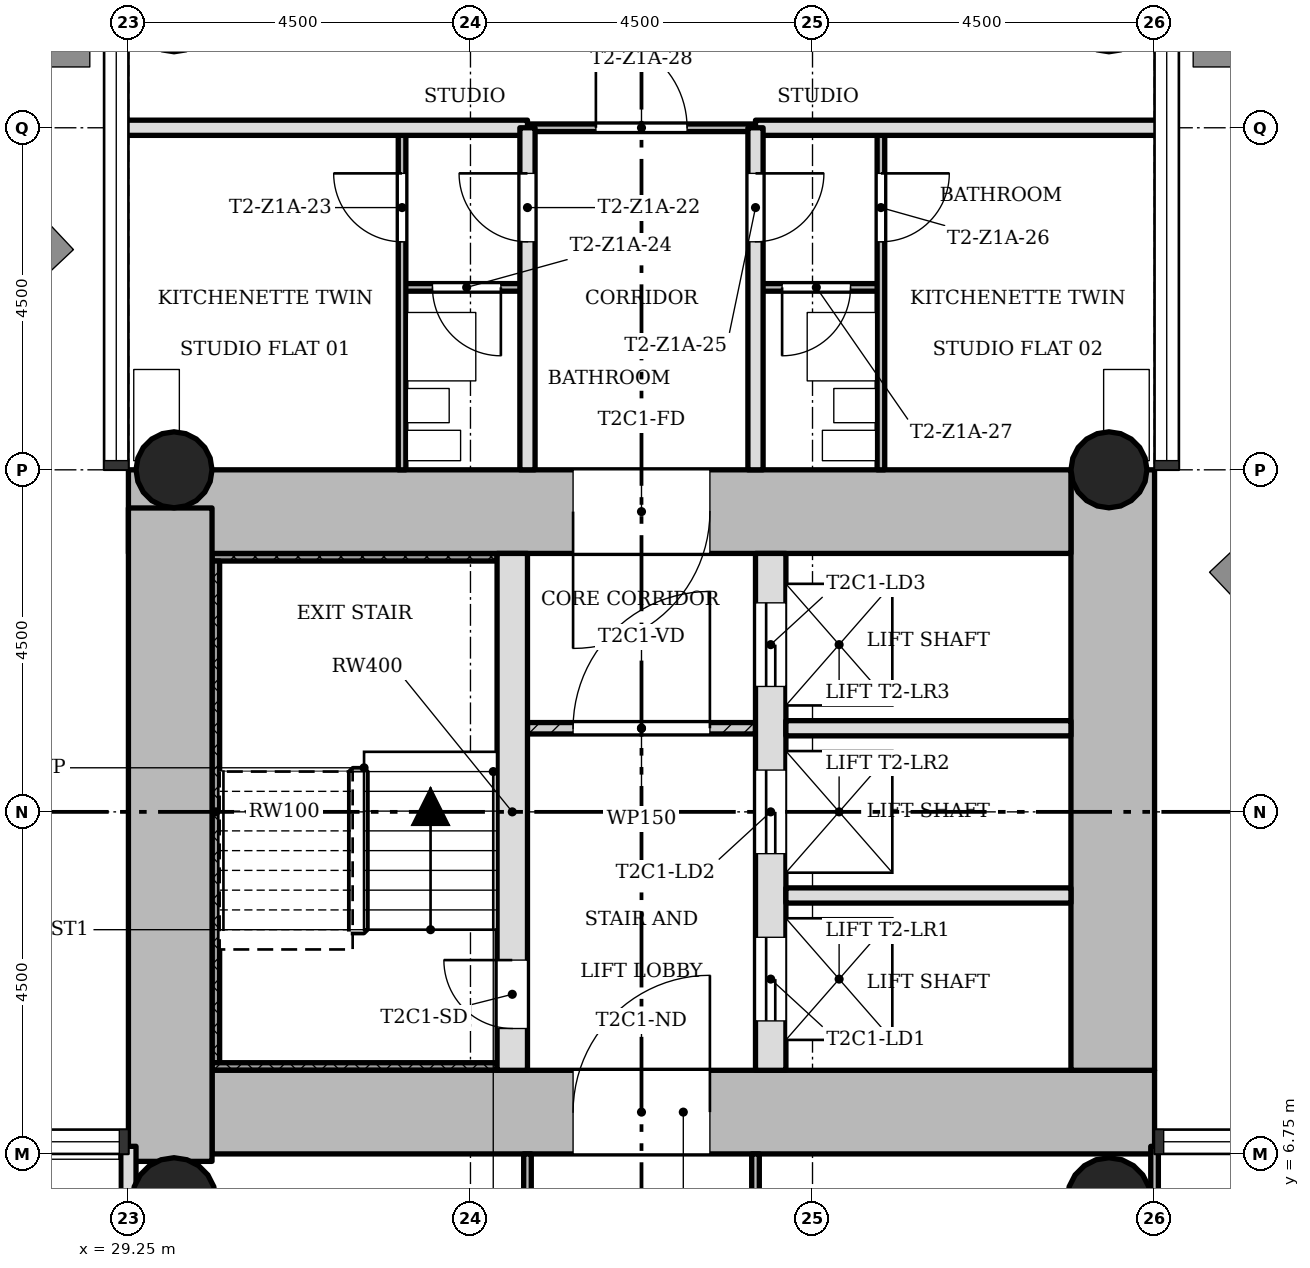
"""IFC4 building model, lengths in metres.
Left out: names, types, materials, properties, quantities, classifications, styles, units other than length and angle.
Written with IfcOpenShell. Run it as: python <this file> out.ifc"""

import sys

from ifc_helpers import new_model, si_unit, direction, frame, frame_2d, origin, origin_2d, place, context, subcontext, project, spatial, rectangle, hollow_circle, extrude, element, fill, save


model = new_model("IFC4")
c1 = context("Model", 3, precision=1e-05, world=origin(), true_north=direction((0.0, 1.0)))
c2 = subcontext(c1, "Body", "Model", "MODEL_VIEW")
j1 = project(units=[si_unit("LENGTHUNIT", "METRE"), si_unit("PLANEANGLEUNIT", "RADIAN")], contexts=[c1])
p1 = place(None, origin())
s1 = spatial("IfcSite", under=j1, at=p1, CompositionType="ELEMENT")
p2 = place(p1, origin())
s2 = spatial("IfcBuilding", under=s1, at=p2, CompositionType="ELEMENT")
p3 = place(p2, frame((0.0, 0.0, 31.3)))
s3 = spatial("IfcBuildingStorey", under=s2, at=p3, CompositionType="ELEMENT", Elevation=31.3)
p4 = place(p3, frame((30.35, 7.3, 0.0), z_axis=(0.0, 0.0, 1.0), x_axis=(1.0, 0.0, 0.0)))
e1 = element("IfcWall", 1, at=p4, inside=s3, PredefinedType="SHEAR", context=c2, shape_type="SweptSolid", body=[
    extrude(rectangle(XDim=12.4, YDim=1.1, at=frame_2d((6.2, 0.0))), origin(), (0.0, 0.0, 1.0), 3.4),
])
p5 = place(p4, frame((4.75, 0.0, 0.0)))
e2 = element("IfcOpeningElement", 2, at=p5, cuts=e1, PredefinedType="OPENING", context=c2, shape_type="SweptSolid", body=[
    extrude(rectangle(XDim=1.8, YDim=2.1, at=frame_2d((0.9, 1.05))), frame((0.0, 0.56, 0.0), z_axis=(0.0, -1.0, 0.0), x_axis=(1.0, 0.0, 0.0)), (0.0, 0.0, 1.0), 1.12),
])
p6 = place(p3, frame((42.2, 7.85, 0.0), z_axis=(0.0, 0.0, 1.0), x_axis=(0.0, 1.0, 0.0)))
e3 = element("IfcWall", 3, at=p6, inside=s3, PredefinedType="SHEAR", context=c2, shape_type="SweptSolid", body=[
    extrude(rectangle(XDim=7.9, YDim=1.1, at=frame_2d((3.95, 0.0))), origin(), (0.0, 0.0, 1.0), 3.4),
])
p7 = place(p3, frame((41.65, 15.2, 0.0), z_axis=(0.0, 0.0, 1.0), x_axis=(-1.0, 0.0, 0.0)))
e4 = element("IfcWall", 4, at=p7, inside=s3, PredefinedType="SHEAR", context=c2, shape_type="SweptSolid", body=[
    extrude(rectangle(XDim=12.4, YDim=1.1, at=frame_2d((6.2, 0.0))), origin(), (0.0, 0.0, 1.0), 3.4),
])
p8 = place(p7, frame((4.75, 0.0, 0.0)))
e5 = element("IfcOpeningElement", 5, at=p8, cuts=e4, PredefinedType="OPENING", context=c2, shape_type="SweptSolid", body=[
    extrude(rectangle(XDim=1.8, YDim=2.1, at=frame_2d((0.9, 1.05))), frame((0.0, 0.56, 0.0), z_axis=(0.0, -1.0, 0.0), x_axis=(1.0, 0.0, 0.0)), (0.0, 0.0, 1.0), 1.12),
])
p9 = place(p3, frame((29.8, 15.248, 0.0), z_axis=(0.0, 0.0, 1.0), x_axis=(0.0, -1.0, 0.0)))
e6 = element("IfcWall", 6, at=p9, inside=s3, PredefinedType="SHEAR", context=c2, shape_type="SweptSolid", body=[
    extrude(rectangle(XDim=8.596, YDim=1.1, at=frame_2d((4.298, 0.0))), origin(), (0.0, 0.0, 1.0), 3.4),
])
p10 = place(p3, frame((34.3, 7.85, 0.0), z_axis=(0.0, 0.0, 1.0), x_axis=(0.0, 1.0, 0.0)))
e7 = element("IfcWall", 7, at=p10, inside=s3, PredefinedType="SHEAR", context=c2, shape_type="SweptSolid", body=[
    extrude(rectangle(XDim=6.8, YDim=0.4, at=frame_2d((3.4, 0.0))), origin(), (0.0, 0.0, 1.0), 3.4),
])
p11 = place(p10, frame((0.55, 0.0, 0.0)))
e8 = element("IfcOpeningElement", 8, at=p11, cuts=e7, PredefinedType="OPENING", context=c2, shape_type="SweptSolid", body=[
    extrude(rectangle(XDim=0.9, YDim=2.1, at=frame_2d((0.45, 1.05))), frame((0.0, 0.21, 0.0), z_axis=(0.0, -1.0, 0.0), x_axis=(1.0, 0.0, 0.0)), (0.0, 0.0, 1.0), 0.42),
])
p12 = place(p3, frame((37.7, 7.85, 0.0), z_axis=(0.0, 0.0, 1.0), x_axis=(0.0, 1.0, 0.0)))
e9 = element("IfcWall", 9, at=p12, inside=s3, PredefinedType="SHEAR", context=c2, shape_type="SweptSolid", body=[
    extrude(rectangle(XDim=6.8, YDim=0.4, at=frame_2d((3.4, 0.0))), origin(), (0.0, 0.0, 1.0), 3.4),
])
p13 = place(p12, frame((0.65, 0.0, 0.0)))
e10 = element("IfcOpeningElement", 10, at=p13, cuts=e9, PredefinedType="OPENING", context=c2, shape_type="SweptSolid", body=[
    extrude(rectangle(XDim=1.1, YDim=2.1, at=frame_2d((0.55, 1.05))), frame((0.0, 0.21, 0.0), z_axis=(0.0, -1.0, 0.0), x_axis=(1.0, 0.0, 0.0)), (0.0, 0.0, 1.0), 0.42),
])
p14 = place(p12, frame((2.85, 0.0, 0.0)))
e11 = element("IfcOpeningElement", 11, at=p14, cuts=e9, PredefinedType="OPENING", context=c2, shape_type="SweptSolid", body=[
    extrude(rectangle(XDim=1.1, YDim=2.1, at=frame_2d((0.55, 1.05))), frame((0.0, 0.21, 0.0), z_axis=(0.0, -1.0, 0.0), x_axis=(1.0, 0.0, 0.0)), (0.0, 0.0, 1.0), 0.42),
])
p15 = place(p12, frame((5.05, 0.0, 0.0)))
e12 = element("IfcOpeningElement", 12, at=p15, cuts=e9, PredefinedType="OPENING", context=c2, shape_type="SweptSolid", body=[
    extrude(rectangle(XDim=1.1, YDim=2.1, at=frame_2d((0.55, 1.05))), frame((0.0, 0.21, 0.0), z_axis=(0.0, -1.0, 0.0), x_axis=(1.0, 0.0, 0.0)), (0.0, 0.0, 1.0), 0.42),
])
for number, where, z_axis, x_axis in (
    (13, (42.15, 15.75, 0.0), (0.0, 0.0, 1.0), (1.0, 0.0, 0.0)),
    (14, (29.85, 15.75, 0.0), (0.0, 0.0, 1.0), (1.0, 0.0, 0.0)),
):
    element("IfcColumn", number, at=place(p3, frame(where, z_axis=z_axis, x_axis=x_axis)), inside=s3, PredefinedType="COLUMN", context=c2, shape_type="SweptSolid", body=[
        extrude(hollow_circle(Radius=0.5, WallThickness=0.036, at=origin_2d()), origin(), (0.0, 0.0, 1.0), 3.4),
    ])
for number, where, z_axis, x_axis in (
    (15, (42.15, 6.15, 0.0), (0.0, 0.0, 1.0), (1.0, 0.0, 0.0)),
    (16, (29.85, 6.15, 0.0), (0.0, 0.0, 1.0), (1.0, 0.0, 0.0)),
):
    element("IfcColumn", number, at=place(p3, frame(where, z_axis=z_axis, x_axis=x_axis)), inside=s3, PredefinedType="COLUMN", context=c2, shape_type="SweptSolid", body=[
        extrude(hollow_circle(Radius=0.55, WallThickness=0.04, at=origin_2d()), origin(), (0.0, 0.0, 1.0), 3.4),
    ])
p16 = place(p3, frame((37.5, 12.35, 0.0), z_axis=(0.0, 0.0, 1.0), x_axis=(-1.0, 0.0, 0.0)))
e17 = element("IfcWall", 17, at=p16, inside=s3, PredefinedType="PARTITIONING", context=c2, shape_type="SweptSolid", body=[
    extrude(rectangle(XDim=3.0, YDim=0.15, at=frame_2d((1.5, 0.0))), origin(), (0.0, 0.0, 1.0), 3.0),
])
p17 = place(p16, frame((0.6, 0.0, 0.0)))
e18 = element("IfcOpeningElement", 18, at=p17, cuts=e17, PredefinedType="OPENING", context=c2, shape_type="SweptSolid", body=[
    extrude(rectangle(XDim=1.8, YDim=2.1, at=frame_2d((0.9, 1.05))), frame((0.0, 0.085, 0.0), z_axis=(0.0, -1.0, 0.0), x_axis=(1.0, 0.0, 0.0)), (0.0, 0.0, 1.0), 0.17),
])
for number, where, z_axis, x_axis in (
    (19, (41.65, 10.15, 0.0), (0.0, 0.0, 1.0), (-1.0, 0.0, 0.0)),
    (20, (41.65, 12.35, 0.0), (0.0, 0.0, 1.0), (-1.0, 0.0, 0.0)),
):
    element("IfcWall", number, at=place(p3, frame(where, z_axis=z_axis, x_axis=x_axis)), inside=s3, PredefinedType="SOLIDWALL", context=c2, shape_type="SweptSolid", body=[
        extrude(rectangle(XDim=3.75, YDim=0.2, at=frame_2d((1.875, 0.0))), origin(), (0.0, 0.0, 1.0), 3.0),
    ])
p18 = place(p3, frame((39.15, 18.15, 0.0), z_axis=(0.0, 0.0, 1.0), x_axis=(-1.0, 0.0, 0.0)))
e21 = element("IfcWall", 21, at=p18, inside=s3, PredefinedType="PARTITIONING", context=c2, shape_type="SweptSolid", body=[
    extrude(rectangle(XDim=1.65, YDim=0.1, at=frame_2d((0.825, 0.0))), origin(), (0.0, 0.0, 1.0), 3.0),
])
p19 = place(p18, frame((0.4, 0.0, 0.0)))
e22 = element("IfcOpeningElement", 22, at=p19, cuts=e21, PredefinedType="OPENING", context=c2, shape_type="SweptSolid", body=[
    extrude(rectangle(XDim=0.9, YDim=2.1, at=frame_2d((0.45, 1.05))), frame((0.0, 0.06, 0.0), z_axis=(0.0, -1.0, 0.0), x_axis=(1.0, 0.0, 0.0)), (0.0, 0.0, 1.0), 0.12),
])
p20 = place(p3, frame((34.5, 18.15, 0.0), z_axis=(0.0, 0.0, 1.0), x_axis=(-1.0, 0.0, 0.0)))
e23 = element("IfcWall", 23, at=p20, inside=s3, PredefinedType="PARTITIONING", context=c2, shape_type="SweptSolid", body=[
    extrude(rectangle(XDim=1.65, YDim=0.1, at=frame_2d((0.825, 0.0))), origin(), (0.0, 0.0, 1.0), 3.0),
])
p21 = place(p20, frame((0.35, 0.0, 0.0)))
e24 = element("IfcOpeningElement", 24, at=p21, cuts=e23, PredefinedType="OPENING", context=c2, shape_type="SweptSolid", body=[
    extrude(rectangle(XDim=0.9, YDim=2.1, at=frame_2d((0.45, 1.05))), frame((0.0, 0.06, 0.0), z_axis=(0.0, -1.0, 0.0), x_axis=(1.0, 0.0, 0.0)), (0.0, 0.0, 1.0), 0.12),
])
p22 = place(p3, frame((37.5, 20.25, 0.0), z_axis=(0.0, 0.0, 1.0), x_axis=(-1.0, 0.0, 0.0)))
e25 = element("IfcWall", 25, at=p22, inside=s3, PredefinedType="PARTITIONING", context=c2, shape_type="SweptSolid", body=[
    extrude(rectangle(XDim=3.0, YDim=0.1, at=frame_2d((1.5, 0.0))), origin(), (0.0, 0.0, 1.0), 3.0),
])
p23 = place(p22, frame((0.9, 0.0, 0.0)))
e26 = element("IfcOpeningElement", 26, at=p23, cuts=e25, PredefinedType="OPENING", context=c2, shape_type="SweptSolid", body=[
    extrude(rectangle(XDim=1.2, YDim=2.1, at=frame_2d((0.6, 1.05))), frame((0.0, 0.06, 0.0), z_axis=(0.0, -1.0, 0.0), x_axis=(1.0, 0.0, 0.0)), (0.0, 0.0, 1.0), 0.12),
])
for number, where, z_axis, x_axis in (
    (27, (42.85, 20.25, 0.0), (0.0, 0.0, 1.0), (-1.0, 0.0, 0.0)),
    (28, (34.5, 20.25, 0.0), (0.0, 0.0, 1.0), (-1.0, 0.0, 0.0)),
):
    element("IfcWall", number, at=place(p3, frame(where, z_axis=z_axis, x_axis=x_axis)), inside=s3, PredefinedType="SOLIDWALL", context=c2, shape_type="SweptSolid", body=[
        extrude(rectangle(XDim=5.35, YDim=0.2, at=frame_2d((2.675, 0.0))), origin(), (0.0, 0.0, 1.0), 3.0),
    ])
p24 = place(p3, frame((42.75, 0.9, 0.0), z_axis=(0.0, 0.0, 1.0), x_axis=(0.0, 1.0, 0.0)))
e29 = element("IfcWall", 29, at=p24, inside=s3, PredefinedType="PARTITIONING", context=c2, shape_type="SweptSolid", body=[
    extrude(rectangle(XDim=5.95, YDim=0.1, at=frame_2d((2.975, 0.0))), origin(), (0.0, 0.0, 1.0), 3.0),
])
p25 = place(p3, frame((39.15, 15.75, 0.0), z_axis=(0.0, 0.0, 1.0), x_axis=(0.0, 1.0, 0.0)))
e30 = element("IfcWall", 30, at=p25, inside=s3, PredefinedType="PARTITIONING", context=c2, shape_type="SweptSolid", body=[
    extrude(rectangle(XDim=4.5, YDim=0.1, at=frame_2d((2.25, 0.0))), origin(), (0.0, 0.0, 1.0), 3.0),
])
p26 = place(p25, frame((3.0, 0.0, 0.0)))
e31 = element("IfcOpeningElement", 31, at=p26, cuts=e30, PredefinedType="OPENING", context=c2, shape_type="SweptSolid", body=[
    extrude(rectangle(XDim=0.9, YDim=2.1, at=frame_2d((0.45, 1.05))), frame((0.0, 0.06, 0.0), z_axis=(0.0, -1.0, 0.0), x_axis=(1.0, 0.0, 0.0)), (0.0, 0.0, 1.0), 0.12),
])
p27 = place(p3, frame((37.5, 0.9, 0.0), z_axis=(0.0, 0.0, 1.0), x_axis=(0.0, 1.0, 0.0)))
e32 = element("IfcWall", 32, at=p27, inside=s3, PredefinedType="PARTITIONING", context=c2, shape_type="SweptSolid", body=[
    extrude(rectangle(XDim=5.85, YDim=0.1, at=frame_2d((2.925, 0.0))), origin(), (0.0, 0.0, 1.0), 3.0),
])
p28 = place(p27, frame((2.475, 0.0, 0.0)))
e33 = element("IfcOpeningElement", 33, at=p28, cuts=e32, PredefinedType="OPENING", context=c2, shape_type="SweptSolid", body=[
    extrude(rectangle(XDim=0.9, YDim=2.1, at=frame_2d((0.45, 1.05))), frame((0.0, 0.06, 0.0), z_axis=(0.0, -1.0, 0.0), x_axis=(1.0, 0.0, 0.0)), (0.0, 0.0, 1.0), 0.12),
])
p29 = place(p3, frame((37.5, 15.75, 0.0), z_axis=(0.0, 0.0, 1.0), x_axis=(0.0, 1.0, 0.0)))
e34 = element("IfcWall", 34, at=p29, inside=s3, PredefinedType="SOLIDWALL", context=c2, shape_type="SweptSolid", body=[
    extrude(rectangle(XDim=4.5, YDim=0.2, at=frame_2d((2.25, 0.0))), origin(), (0.0, 0.0, 1.0), 3.0),
])
p30 = place(p29, frame((3.0, 0.0, 0.0)))
e35 = element("IfcOpeningElement", 35, at=p30, cuts=e34, PredefinedType="OPENING", context=c2, shape_type="SweptSolid", body=[
    extrude(rectangle(XDim=0.9, YDim=2.1, at=frame_2d((0.45, 1.05))), frame((0.0, 0.11, 0.0), z_axis=(0.0, -1.0, 0.0), x_axis=(1.0, 0.0, 0.0)), (0.0, 0.0, 1.0), 0.22),
])
p31 = place(p3, frame((34.5, 0.9, 0.0), z_axis=(0.0, 0.0, 1.0), x_axis=(0.0, 1.0, 0.0)))
e36 = element("IfcWall", 36, at=p31, inside=s3, PredefinedType="PARTITIONING", context=c2, shape_type="SweptSolid", body=[
    extrude(rectangle(XDim=5.85, YDim=0.1, at=frame_2d((2.925, 0.0))), origin(), (0.0, 0.0, 1.0), 3.0),
])
p32 = place(p31, frame((2.475, 0.0, 0.0)))
e37 = element("IfcOpeningElement", 37, at=p32, cuts=e36, PredefinedType="OPENING", context=c2, shape_type="SweptSolid", body=[
    extrude(rectangle(XDim=0.9, YDim=2.1, at=frame_2d((0.45, 1.05))), frame((0.0, 0.06, 0.0), z_axis=(0.0, -1.0, 0.0), x_axis=(1.0, 0.0, 0.0)), (0.0, 0.0, 1.0), 0.12),
])
p33 = place(p3, frame((34.5, 15.75, 0.0), z_axis=(0.0, 0.0, 1.0), x_axis=(0.0, 1.0, 0.0)))
e38 = element("IfcWall", 38, at=p33, inside=s3, PredefinedType="SOLIDWALL", context=c2, shape_type="SweptSolid", body=[
    extrude(rectangle(XDim=4.5, YDim=0.2, at=frame_2d((2.25, 0.0))), origin(), (0.0, 0.0, 1.0), 3.0),
])
p34 = place(p33, frame((3.0, 0.0, 0.0)))
e39 = element("IfcOpeningElement", 39, at=p34, cuts=e38, PredefinedType="OPENING", context=c2, shape_type="SweptSolid", body=[
    extrude(rectangle(XDim=0.9, YDim=2.1, at=frame_2d((0.45, 1.05))), frame((0.0, 0.11, 0.0), z_axis=(0.0, -1.0, 0.0), x_axis=(1.0, 0.0, 0.0)), (0.0, 0.0, 1.0), 0.22),
])
p35 = place(p3, frame((32.85, 15.75, 0.0), z_axis=(0.0, 0.0, 1.0), x_axis=(0.0, 1.0, 0.0)))
e40 = element("IfcWall", 40, at=p35, inside=s3, PredefinedType="PARTITIONING", context=c2, shape_type="SweptSolid", body=[
    extrude(rectangle(XDim=4.5, YDim=0.1, at=frame_2d((2.25, 0.0))), origin(), (0.0, 0.0, 1.0), 3.0),
])
p36 = place(p35, frame((3.0, 0.0, 0.0)))
e41 = element("IfcOpeningElement", 41, at=p36, cuts=e40, PredefinedType="OPENING", context=c2, shape_type="SweptSolid", body=[
    extrude(rectangle(XDim=0.9, YDim=2.1, at=frame_2d((0.45, 1.05))), frame((0.0, 0.06, 0.0), z_axis=(0.0, -1.0, 0.0), x_axis=(1.0, 0.0, 0.0)), (0.0, 0.0, 1.0), 0.12),
])
p37 = place(p3, frame((29.25, -6.85, 0.0), z_axis=(0.0, 0.0, 1.0), x_axis=(0.0, 1.0, 0.0)))
e42 = element("IfcWall", 42, at=p37, inside=s3, PredefinedType="SOLIDWALL", context=c2, shape_type="SweptSolid", body=[
    extrude(rectangle(XDim=13.7, YDim=0.2, at=frame_2d((6.85, 0.0))), origin(), (0.0, 0.0, 1.0), 3.0),
])
p38 = place(p37, frame((6.4, 0.0, 0.0)))
e43 = element("IfcOpeningElement", 43, at=p38, cuts=e42, PredefinedType="OPENING", context=c2, shape_type="SweptSolid", body=[
    extrude(rectangle(XDim=0.9, YDim=2.1, at=frame_2d((0.45, 1.05))), frame((0.0, 0.11, 0.0), z_axis=(0.0, -1.0, 0.0), x_axis=(1.0, 0.0, 0.0)), (0.0, 0.0, 1.0), 0.22),
])
p39 = place(p3, frame((34.1, 14.6, 0.0), z_axis=(0.0, 0.0, 1.0), x_axis=(-1.0, 0.0, 0.0)))
e44 = element("IfcWall", 44, at=p39, inside=s3, PredefinedType="SHEAR", context=c2, shape_type="SweptSolid", body=[
    extrude(rectangle(XDim=3.75, YDim=0.1, at=frame_2d((1.875, 0.0))), origin(), (0.0, 0.0, 1.0), 3.4),
])
p40 = place(p3, frame((30.4, 7.95, 0.0), z_axis=(0.0, 0.0, 1.0), x_axis=(0.0, 1.0, 0.0)))
e45 = element("IfcWall", 45, at=p40, inside=s3, PredefinedType="SHEAR", context=c2, shape_type="SweptSolid", body=[
    extrude(rectangle(XDim=6.6, YDim=0.1, at=frame_2d((3.3, 0.0))), origin(), (0.0, 0.0, 1.0), 3.4),
])
p41 = place(p3, frame((34.1, 7.9, 0.0), z_axis=(0.0, 0.0, 1.0), x_axis=(-1.0, 0.0, 0.0)))
e46 = element("IfcWall", 46, at=p41, inside=s3, PredefinedType="SHEAR", context=c2, shape_type="SweptSolid", body=[
    extrude(rectangle(XDim=3.75, YDim=0.1, at=frame_2d((1.875, 0.0))), origin(), (0.0, 0.0, 1.0), 3.4),
])
p42 = place(p17, origin())
e47 = element("IfcDoor", 47, at=p42, inside=s3, OperationType="SINGLE_SWING_LEFT", PredefinedType="DOOR", context=c2, shape_type="SweptSolid", body=[
    extrude(rectangle(XDim=1.8, YDim=2.1, at=frame_2d((0.9, 1.05))), frame((0.0, 0.025, 0.0), z_axis=(0.0, -1.0, 0.0), x_axis=(1.0, 0.0, 0.0)), (0.0, 0.0, 1.0), 0.05),
])
fill(e18, e47)
p43 = place(p34, origin())
e48 = element("IfcDoor", 48, at=p43, inside=s3, OperationType="SINGLE_SWING_LEFT", PredefinedType="DOOR", context=c2, shape_type="SweptSolid", body=[
    extrude(rectangle(XDim=0.9, YDim=2.1, at=frame_2d((0.45, 1.05))), frame((0.0, 0.025, 0.0), z_axis=(0.0, -1.0, 0.0), x_axis=(1.0, 0.0, 0.0)), (0.0, 0.0, 1.0), 0.05),
])
fill(e39, e48)
p44 = place(p36, origin())
e49 = element("IfcDoor", 49, at=p44, inside=s3, OperationType="SINGLE_SWING_LEFT", PredefinedType="DOOR", context=c2, shape_type="SweptSolid", body=[
    extrude(rectangle(XDim=0.9, YDim=2.1, at=frame_2d((0.45, 1.05))), frame((0.0, 0.025, 0.0), z_axis=(0.0, -1.0, 0.0), x_axis=(1.0, 0.0, 0.0)), (0.0, 0.0, 1.0), 0.05),
])
fill(e41, e49)
p45 = place(p21, origin())
e50 = element("IfcDoor", 50, at=p45, inside=s3, OperationType="SINGLE_SWING_RIGHT", PredefinedType="DOOR", context=c2, shape_type="SweptSolid", body=[
    extrude(rectangle(XDim=0.9, YDim=2.1, at=frame_2d((0.45, 1.05))), frame((0.0, 0.025, 0.0), z_axis=(0.0, -1.0, 0.0), x_axis=(1.0, 0.0, 0.0)), (0.0, 0.0, 1.0), 0.05),
])
fill(e24, e50)
p46 = place(p30, origin())
e51 = element("IfcDoor", 51, at=p46, inside=s3, OperationType="SINGLE_SWING_RIGHT", PredefinedType="DOOR", context=c2, shape_type="SweptSolid", body=[
    extrude(rectangle(XDim=0.9, YDim=2.1, at=frame_2d((0.45, 1.05))), frame((0.0, 0.025, 0.0), z_axis=(0.0, -1.0, 0.0), x_axis=(1.0, 0.0, 0.0)), (0.0, 0.0, 1.0), 0.05),
])
fill(e35, e51)
p47 = place(p26, origin())
e52 = element("IfcDoor", 52, at=p47, inside=s3, OperationType="SINGLE_SWING_RIGHT", PredefinedType="DOOR", context=c2, shape_type="SweptSolid", body=[
    extrude(rectangle(XDim=0.9, YDim=2.1, at=frame_2d((0.45, 1.05))), frame((0.0, 0.025, 0.0), z_axis=(0.0, -1.0, 0.0), x_axis=(1.0, 0.0, 0.0)), (0.0, 0.0, 1.0), 0.05),
])
fill(e31, e52)
p48 = place(p19, origin())
e53 = element("IfcDoor", 53, at=p48, inside=s3, OperationType="SINGLE_SWING_LEFT", PredefinedType="DOOR", context=c2, shape_type="SweptSolid", body=[
    extrude(rectangle(XDim=0.9, YDim=2.1, at=frame_2d((0.45, 1.05))), frame((0.0, 0.025, 0.0), z_axis=(0.0, -1.0, 0.0), x_axis=(1.0, 0.0, 0.0)), (0.0, 0.0, 1.0), 0.05),
])
fill(e22, e53)
p49 = place(p23, origin())
e54 = element("IfcDoor", 54, at=p49, inside=s3, OperationType="SINGLE_SWING_RIGHT", PredefinedType="DOOR", context=c2, shape_type="SweptSolid", body=[
    extrude(rectangle(XDim=1.2, YDim=2.1, at=frame_2d((0.6, 1.05))), frame((0.0, 0.025, 0.0), z_axis=(0.0, -1.0, 0.0), x_axis=(1.0, 0.0, 0.0)), (0.0, 0.0, 1.0), 0.05),
])
fill(e26, e54)
p50 = place(p11, origin())
e55 = element("IfcDoor", 55, at=p50, inside=s3, OperationType="SINGLE_SWING_LEFT", PredefinedType="DOOR", context=c2, shape_type="SweptSolid", body=[
    extrude(rectangle(XDim=0.9, YDim=2.1, at=frame_2d((0.45, 1.05))), frame((0.0, 0.025, 0.0), z_axis=(0.0, -1.0, 0.0), x_axis=(1.0, 0.0, 0.0)), (0.0, 0.0, 1.0), 0.05),
])
fill(e8, e55)
p51 = place(p13, origin())
e56 = element("IfcDoor", 56, at=p51, inside=s3, OperationType="SLIDING_TO_LEFT", PredefinedType="DOOR", context=c2, shape_type="SweptSolid", body=[
    extrude(rectangle(XDim=1.1, YDim=2.1, at=frame_2d((0.55, 1.05))), frame((0.0, 0.025, 0.0), z_axis=(0.0, -1.0, 0.0), x_axis=(1.0, 0.0, 0.0)), (0.0, 0.0, 1.0), 0.05),
])
fill(e10, e56)
p52 = place(p14, origin())
e57 = element("IfcDoor", 57, at=p52, inside=s3, OperationType="SLIDING_TO_LEFT", PredefinedType="DOOR", context=c2, shape_type="SweptSolid", body=[
    extrude(rectangle(XDim=1.1, YDim=2.1, at=frame_2d((0.55, 1.05))), frame((0.0, 0.025, 0.0), z_axis=(0.0, -1.0, 0.0), x_axis=(1.0, 0.0, 0.0)), (0.0, 0.0, 1.0), 0.05),
])
fill(e11, e57)
p53 = place(p15, origin())
e58 = element("IfcDoor", 58, at=p53, inside=s3, OperationType="SLIDING_TO_LEFT", PredefinedType="DOOR", context=c2, shape_type="SweptSolid", body=[
    extrude(rectangle(XDim=1.1, YDim=2.1, at=frame_2d((0.55, 1.05))), frame((0.0, 0.025, 0.0), z_axis=(0.0, -1.0, 0.0), x_axis=(1.0, 0.0, 0.0)), (0.0, 0.0, 1.0), 0.05),
])
fill(e12, e58)
p54 = place(p5, origin())
e59 = element("IfcDoor", 59, at=p54, inside=s3, OperationType="SINGLE_SWING_LEFT", PredefinedType="DOOR", context=c2, shape_type="SweptSolid", body=[
    extrude(rectangle(XDim=1.8, YDim=2.1, at=frame_2d((0.9, 1.05))), frame((0.0, 0.025, 0.0), z_axis=(0.0, -1.0, 0.0), x_axis=(1.0, 0.0, 0.0)), (0.0, 0.0, 1.0), 0.05),
])
fill(e2, e59)
p55 = place(p8, origin())
e60 = element("IfcDoor", 60, at=p55, inside=s3, OperationType="SINGLE_SWING_LEFT", PredefinedType="DOOR", context=c2, shape_type="SweptSolid", body=[
    extrude(rectangle(XDim=1.8, YDim=2.1, at=frame_2d((0.9, 1.05))), frame((0.0, 0.025, 0.0), z_axis=(0.0, -1.0, 0.0), x_axis=(1.0, 0.0, 0.0)), (0.0, 0.0, 1.0), 0.05),
])
fill(e5, e60)
save(model, sys.argv[1])
